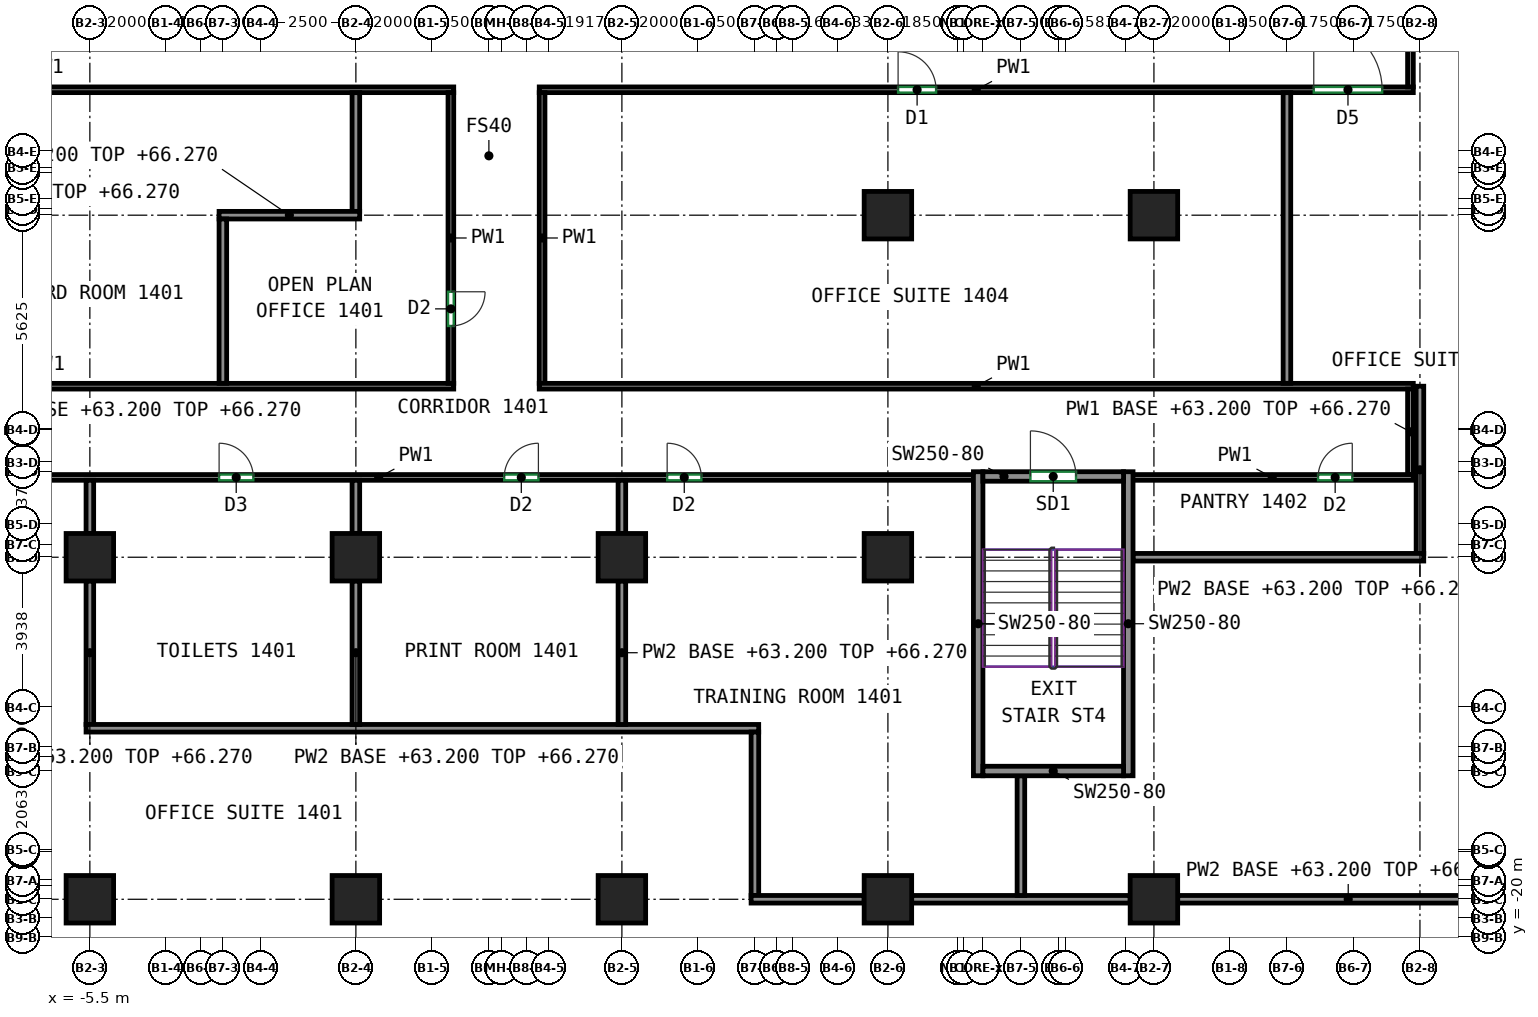
"""IFC4 building model, lengths in metres.
Left out: names, types, materials, properties, quantities, classifications, styles, units other than length and angle.
Written with IfcOpenShell. Run it as: python <this file> out.ifc"""

import sys

from ifc_helpers import new_model, si_unit, direction, frame, frame_2d, origin, origin_2d, place, context, subcontext, project, spatial, rectangle, extrude, source, transform, mapped, element, fill, save


model = new_model("IFC4")
c1 = context("Model", 3, precision=1e-05, world=origin(), true_north=direction((0.0, 1.0)))
c2 = subcontext(c1, "Body", "Model", "MODEL_VIEW")
j1 = project(units=[si_unit("LENGTHUNIT", "METRE"), si_unit("PLANEANGLEUNIT", "RADIAN")], contexts=[c1])
p1 = place(None, origin())
s1 = spatial("IfcSite", under=j1, at=p1, CompositionType="ELEMENT")
p2 = place(p1, origin())
s2 = spatial("IfcBuilding", under=s1, at=p2, CompositionType="ELEMENT")
p3 = place(p2, frame((0.0, 0.0, 63.2)))
s3 = spatial("IfcBuildingStorey", under=s2, at=p3, CompositionType="ELEMENT", Elevation=63.2)
m1 = source(origin(), c2, "Body", "SweptSolid", [
    extrude(rectangle(XDim=1.25, YDim=1.25, at=origin_2d()), origin(), (0.0, 0.0, 1.0), 3.72),
])
for number, where, z_axis, x_axis in (
    (1, (-5.5, -19.0, 0.0), (0.0, 0.0, 1.0), (1.0, 0.0, 0.0)),
    (2, (-5.5, -10.0, 0.0), (0.0, 0.0, 1.0), (1.0, 0.0, 0.0)),
    (3, (1.5, -19.0, 0.0), (0.0, 0.0, 1.0), (1.0, 0.0, 0.0)),
    (4, (1.5, -10.0, 0.0), (0.0, 0.0, 1.0), (1.0, 0.0, 0.0)),
    (5, (8.5, -19.0, 0.0), (0.0, 0.0, 1.0), (1.0, 0.0, 0.0)),
    (6, (8.5, -10.0, 0.0), (0.0, 0.0, 1.0), (1.0, 0.0, 0.0)),
    (7, (15.5, -19.0, 0.0), (0.0, 0.0, 1.0), (1.0, 0.0, 0.0)),
    (8, (15.5, -10.0, 0.0), (0.0, 0.0, 1.0), (1.0, 0.0, 0.0)),
    (9, (15.5, -1.0, 0.0), (0.0, 0.0, 1.0), (1.0, 0.0, 0.0)),
    (10, (22.5, -19.0, 0.0), (0.0, 0.0, 1.0), (1.0, 0.0, 0.0)),
    (11, (22.5, -1.0, 0.0), (0.0, 0.0, 1.0), (1.0, 0.0, 0.0)),
):
    element("IfcColumn", number, at=place(p3, frame(where, z_axis=z_axis, x_axis=x_axis)), inside=s3, PredefinedType="COLUMN", context=c2, shape_type="MappedRepresentation", body=[
        mapped(m1, transform((0.0, 0.0, 0.0))),
    ])
m2 = source(origin(), c2, "Body", "SweptSolid", [
    extrude(rectangle(XDim=8.0, YDim=0.25, at=frame_2d((4.0, 0.0))), origin(), (0.0, 0.0, 1.0), 3.72),
])
for number, where, z_axis, x_axis in (
    (12, (17.875, -15.75, 0.0), (0.0, 0.0, 1.0), (0.0, 1.0, 0.0)),
    (13, (21.825, -15.75, 0.0), (0.0, 0.0, 1.0), (0.0, 1.0, 0.0)),
):
    element("IfcWall", number, at=place(p3, frame(where, z_axis=z_axis, x_axis=x_axis)), inside=s3, PredefinedType="SHEAR", context=c2, shape_type="MappedRepresentation", body=[
        mapped(m2, transform((0.0, 0.0, 0.0))),
    ])
m3 = source(origin(), c2, "Body", "SweptSolid", [
    extrude(rectangle(XDim=3.7, YDim=0.25, at=frame_2d((1.85, 0.0))), origin(), (0.0, 0.0, 1.0), 3.72),
])
p4 = place(p3, frame((18.0, -15.625, 0.0), z_axis=(0.0, 0.0, 1.0), x_axis=(1.0, 0.0, 0.0)))
e14 = element("IfcWall", 14, at=p4, inside=s3, PredefinedType="SHEAR", context=c2, shape_type="MappedRepresentation", body=[
    mapped(m3, transform((0.0, 0.0, 0.0))),
])
p5 = place(p3, frame((18.0, -7.875, 0.0), z_axis=(0.0, 0.0, 1.0), x_axis=(1.0, 0.0, 0.0)))
e15 = element("IfcWall", 15, at=p5, inside=s3, PredefinedType="SHEAR", context=c2, shape_type="MappedRepresentation", body=[
    mapped(m3, transform((0.0, 0.0, 0.0))),
])
p6 = place(p5, frame((1.25, 0.0, 0.0)))
e16 = element("IfcOpeningElement", 16, at=p6, cuts=e15, PredefinedType="OPENING", context=c2, shape_type="SweptSolid", body=[
    extrude(rectangle(XDim=1.2, YDim=2.1, at=frame_2d((0.6, 1.05))), frame((0.0, 0.135, 0.0), z_axis=(0.0, -1.0, 0.0), x_axis=(1.0, 0.0, 0.0)), (0.0, 0.0, 1.0), 0.27),
])
p7 = place(p3, frame((-13.6, -7.9, 0.0), z_axis=(0.0, 0.0, 1.0), x_axis=(1.0, 0.0, 0.0)))
e17 = element("IfcWall", 17, at=p7, inside=s3, PredefinedType="PARTITIONING", context=c2, shape_type="SweptSolid", body=[
    extrude(rectangle(XDim=31.4, YDim=0.15, at=frame_2d((15.7, 0.0))), origin(), (0.0, 0.0, 1.0), 3.72),
])
p8 = place(p7, frame((11.501, 0.0, 0.0)))
e18 = element("IfcOpeningElement", 18, at=p8, cuts=e17, PredefinedType="OPENING", context=c2, shape_type="SweptSolid", body=[
    extrude(rectangle(XDim=0.9, YDim=2.1, at=frame_2d((0.45, 1.05))), frame((0.0, 0.085, 0.0), z_axis=(0.0, -1.0, 0.0), x_axis=(1.0, 0.0, 0.0)), (0.0, 0.0, 1.0), 0.17),
])
p9 = place(p7, frame((19.003, 0.0, 0.0)))
e19 = element("IfcOpeningElement", 19, at=p9, cuts=e17, PredefinedType="OPENING", context=c2, shape_type="SweptSolid", body=[
    extrude(rectangle(XDim=0.9, YDim=2.1, at=frame_2d((0.45, 1.05))), frame((0.0, 0.085, 0.0), z_axis=(0.0, -1.0, 0.0), x_axis=(1.0, 0.0, 0.0)), (0.0, 0.0, 1.0), 0.17),
])
p10 = place(p7, frame((23.291, 0.0, 0.0)))
e20 = element("IfcOpeningElement", 20, at=p10, cuts=e17, PredefinedType="OPENING", context=c2, shape_type="SweptSolid", body=[
    extrude(rectangle(XDim=0.9, YDim=2.1, at=frame_2d((0.45, 1.05))), frame((0.0, 0.085, 0.0), z_axis=(0.0, -1.0, 0.0), x_axis=(1.0, 0.0, 0.0)), (0.0, 0.0, 1.0), 0.17),
])
p11 = place(p3, frame((-19.25, -5.5, 0.0), z_axis=(0.0, 0.0, 1.0), x_axis=(1.0, 0.0, 0.0)))
e21 = element("IfcWall", 21, at=p11, inside=s3, PredefinedType="PARTITIONING", context=c2, shape_type="SweptSolid", body=[
    extrude(rectangle(XDim=23.325, YDim=0.15, at=frame_2d((11.663, 0.0))), origin(), (0.0, 0.0, 1.0), 3.72),
])
p12 = place(p11, frame((9.06, 0.0, 0.0)))
e22 = element("IfcOpeningElement", 22, at=p12, cuts=e21, PredefinedType="OPENING", context=c2, shape_type="SweptSolid", body=[
    extrude(rectangle(XDim=0.9, YDim=2.1, at=frame_2d((0.45, 1.05))), frame((0.0, 0.085, 0.0), z_axis=(0.0, -1.0, 0.0), x_axis=(1.0, 0.0, 0.0)), (0.0, 0.0, 1.0), 0.17),
])
p13 = place(p3, frame((-19.325, 2.3, 0.0), z_axis=(0.0, 0.0, 1.0), x_axis=(1.0, 0.0, 0.0)))
e23 = element("IfcWall", 23, at=p13, inside=s3, PredefinedType="PARTITIONING", context=c2, shape_type="SweptSolid", body=[
    extrude(rectangle(XDim=23.4, YDim=0.15, at=frame_2d((11.7, 0.0))), origin(), (0.0, 0.0, 1.0), 3.72),
])
p14 = place(p13, frame((2.414, 0.0, 0.0)))
e24 = element("IfcOpeningElement", 24, at=p14, cuts=e23, PredefinedType="OPENING", context=c2, shape_type="SweptSolid", body=[
    extrude(rectangle(XDim=0.9, YDim=2.1, at=frame_2d((0.45, 1.05))), frame((0.0, 0.085, 0.0), z_axis=(0.0, -1.0, 0.0), x_axis=(1.0, 0.0, 0.0)), (0.0, 0.0, 1.0), 0.17),
])
p15 = place(p13, frame((7.115, 0.0, 0.0)))
e25 = element("IfcOpeningElement", 25, at=p15, cuts=e23, PredefinedType="OPENING", context=c2, shape_type="SweptSolid", body=[
    extrude(rectangle(XDim=0.9, YDim=2.1, at=frame_2d((0.45, 1.05))), frame((0.0, 0.085, 0.0), z_axis=(0.0, -1.0, 0.0), x_axis=(1.0, 0.0, 0.0)), (0.0, 0.0, 1.0), 0.17),
])
p16 = place(p3, frame((4.0, 2.225, 0.0), z_axis=(0.0, 0.0, 1.0), x_axis=(0.0, -1.0, 0.0)))
e26 = element("IfcWall", 26, at=p16, inside=s3, PredefinedType="PARTITIONING", context=c2, shape_type="SweptSolid", body=[
    extrude(rectangle(XDim=7.65, YDim=0.15, at=frame_2d((3.825, 0.0))), origin(), (0.0, 0.0, 1.0), 3.72),
])
p17 = place(p16, frame((5.24, 0.0, 0.0)))
e27 = element("IfcOpeningElement", 27, at=p17, cuts=e26, PredefinedType="OPENING", context=c2, shape_type="SweptSolid", body=[
    extrude(rectangle(XDim=0.9, YDim=2.1, at=frame_2d((0.45, 1.05))), frame((0.0, 0.085, 0.0), z_axis=(0.0, -1.0, 0.0), x_axis=(1.0, 0.0, 0.0)), (0.0, 0.0, 1.0), 0.17),
])
p18 = place(p3, frame((6.325, 2.3, 0.0), z_axis=(0.0, 0.0, 1.0), x_axis=(1.0, 0.0, 0.0)))
e28 = element("IfcWall", 28, at=p18, inside=s3, PredefinedType="PARTITIONING", context=c2, shape_type="SweptSolid", body=[
    extrude(rectangle(XDim=23.0, YDim=0.15, at=frame_2d((11.5, 0.0))), origin(), (0.0, 0.0, 1.0), 3.72),
])
p19 = place(p18, frame((9.443, 0.0, 0.0)))
e29 = element("IfcOpeningElement", 29, at=p19, cuts=e28, PredefinedType="OPENING", context=c2, shape_type="SweptSolid", body=[
    extrude(rectangle(XDim=1.0, YDim=2.1, at=frame_2d((0.5, 1.05))), frame((0.0, 0.085, 0.0), z_axis=(0.0, -1.0, 0.0), x_axis=(1.0, 0.0, 0.0)), (0.0, 0.0, 1.0), 0.17),
])
p20 = place(p18, frame((20.381, 0.0, 0.0)))
e30 = element("IfcOpeningElement", 30, at=p20, cuts=e28, PredefinedType="OPENING", context=c2, shape_type="SweptSolid", body=[
    extrude(rectangle(XDim=1.8, YDim=2.1, at=frame_2d((0.9, 1.05))), frame((0.0, 0.085, 0.0), z_axis=(0.0, -1.0, 0.0), x_axis=(1.0, 0.0, 0.0)), (0.0, 0.0, 1.0), 0.17),
])
p21 = place(p3, frame((6.4, -5.425, 0.0), z_axis=(0.0, 0.0, 1.0), x_axis=(0.0, 1.0, 0.0)))
e31 = element("IfcWall", 31, at=p21, inside=s3, PredefinedType="PARTITIONING", context=c2, shape_type="SweptSolid", body=[
    extrude(rectangle(XDim=7.65, YDim=0.15, at=frame_2d((3.825, 0.0))), origin(), (0.0, 0.0, 1.0), 3.72),
])
p22 = place(p3, frame((6.325, -5.5, 0.0), z_axis=(0.0, 0.0, 1.0), x_axis=(1.0, 0.0, 0.0)))
e32 = element("IfcWall", 32, at=p22, inside=s3, PredefinedType="PARTITIONING", context=c2, shape_type="SweptSolid", body=[
    extrude(rectangle(XDim=23.0, YDim=0.15, at=frame_2d((11.5, 0.0))), origin(), (0.0, 0.0, 1.0), 3.72),
])
p23 = place(p3, frame((29.25, -7.825, 0.0), z_axis=(0.0, 0.0, 1.0), x_axis=(0.0, 1.0, 0.0)))
e33 = element("IfcWall", 33, at=p23, inside=s3, PredefinedType="PARTITIONING", context=c2, shape_type="SweptSolid", body=[
    extrude(rectangle(XDim=2.25, YDim=0.15, at=frame_2d((1.125, 0.0))), origin(), (0.0, 0.0, 1.0), 3.07),
])
p24 = place(p3, frame((21.9, -7.9, 0.0), z_axis=(0.0, 0.0, 1.0), x_axis=(1.0, 0.0, 0.0)))
e34 = element("IfcWall", 34, at=p24, inside=s3, PredefinedType="PARTITIONING", context=c2, shape_type="SweptSolid", body=[
    extrude(rectangle(XDim=7.425, YDim=0.15, at=frame_2d((3.712, 0.0))), origin(), (0.0, 0.0, 1.0), 3.72),
])
p25 = place(p24, frame((4.919, 0.0, 0.0)))
e35 = element("IfcOpeningElement", 35, at=p25, cuts=e34, PredefinedType="OPENING", context=c2, shape_type="SweptSolid", body=[
    extrude(rectangle(XDim=0.9, YDim=2.1, at=frame_2d((0.45, 1.05))), frame((0.0, 0.085, 0.0), z_axis=(0.0, -1.0, 0.0), x_axis=(1.0, 0.0, 0.0)), (0.0, 0.0, 1.0), 0.17),
])
p26 = place(p3, frame((29.25, 2.375, 0.0), z_axis=(0.0, 0.0, 1.0), x_axis=(0.0, 1.0, 0.0)))
e36 = element("IfcWall", 36, at=p26, inside=s3, PredefinedType="PARTITIONING", context=c2, shape_type="SweptSolid", body=[
    extrude(rectangle(XDim=2.25, YDim=0.15, at=frame_2d((1.125, 0.0))), origin(), (0.0, 0.0, 1.0), 3.07),
])
p27 = place(p3, frame((-5.5, -9.375, 0.0), z_axis=(0.0, 0.0, 1.0), x_axis=(0.0, 1.0, 0.0)))
e37 = element("IfcWall", 37, at=p27, inside=s3, PredefinedType="PARTITIONING", context=c2, shape_type="SweptSolid", body=[
    extrude(rectangle(XDim=1.399, YDim=0.2, at=frame_2d((0.699, 0.0))), origin(), (0.0, 0.0, 1.0), 3.72),
])
p28 = place(p3, frame((-5.5, -14.4, 0.0), z_axis=(0.0, 0.0, 1.0), x_axis=(0.0, 1.0, 0.0)))
e38 = element("IfcWall", 38, at=p28, inside=s3, PredefinedType="PARTITIONING", context=c2, shape_type="SweptSolid", body=[
    extrude(rectangle(XDim=3.775, YDim=0.2, at=frame_2d((1.887, 0.0))), origin(), (0.0, 0.0, 1.0), 3.07),
])
p29 = place(p3, frame((-5.6, -14.5, 0.0), z_axis=(0.0, 0.0, 1.0), x_axis=(1.0, 0.0, 0.0)))
e39 = element("IfcWall", 39, at=p29, inside=s3, PredefinedType="PARTITIONING", context=c2, shape_type="SweptSolid", body=[
    extrude(rectangle(XDim=17.7, YDim=0.2, at=frame_2d((8.85, 0.0))), origin(), (0.0, 0.0, 1.0), 3.72),
])
p30 = place(p3, frame((12.0, -18.9, 0.0), z_axis=(0.0, 0.0, 1.0), x_axis=(0.0, 1.0, 0.0)))
e40 = element("IfcWall", 40, at=p30, inside=s3, PredefinedType="PARTITIONING", context=c2, shape_type="SweptSolid", body=[
    extrude(rectangle(XDim=4.3, YDim=0.2, at=frame_2d((2.15, 0.0))), origin(), (0.0, 0.0, 1.0), 3.72),
])
p31 = place(p3, frame((11.9, -19.0, 0.0), z_axis=(0.0, 0.0, 1.0), x_axis=(1.0, 0.0, 0.0)))
e41 = element("IfcWall", 41, at=p31, inside=s3, PredefinedType="PARTITIONING", context=c2, shape_type="SweptSolid", body=[
    extrude(rectangle(XDim=2.975, YDim=0.2, at=frame_2d((1.488, 0.0))), origin(), (0.0, 0.0, 1.0), 3.72),
])
p32 = place(p3, frame((16.125, -19.0, 0.0), z_axis=(0.0, 0.0, 1.0), x_axis=(1.0, 0.0, 0.0)))
e42 = element("IfcWall", 42, at=p32, inside=s3, PredefinedType="PARTITIONING", context=c2, shape_type="SweptSolid", body=[
    extrude(rectangle(XDim=5.75, YDim=0.2, at=frame_2d((2.875, 0.0))), origin(), (0.0, 0.0, 1.0), 3.72),
])
p33 = place(p3, frame((23.125, -19.0, 0.0), z_axis=(0.0, 0.0, 1.0), x_axis=(1.0, 0.0, 0.0)))
e43 = element("IfcWall", 43, at=p33, inside=s3, PredefinedType="PARTITIONING", context=c2, shape_type="SweptSolid", body=[
    extrude(rectangle(XDim=8.975, YDim=0.2, at=frame_2d((4.488, 0.0))), origin(), (0.0, 0.0, 1.0), 3.07),
])
p34 = place(p3, frame((1.5, -0.9, 0.0), z_axis=(0.0, 0.0, 1.0), x_axis=(0.0, 1.0, 0.0)))
e44 = element("IfcWall", 44, at=p34, inside=s3, PredefinedType="PARTITIONING", context=c2, shape_type="SweptSolid", body=[
    extrude(rectangle(XDim=3.124, YDim=0.2, at=frame_2d((1.562, 0.0))), origin(), (0.0, 0.0, 1.0), 3.72),
])
p35 = place(p3, frame((-2.1, -1.0, 0.0), z_axis=(0.0, 0.0, 1.0), x_axis=(1.0, 0.0, 0.0)))
e45 = element("IfcWall", 45, at=p35, inside=s3, PredefinedType="PARTITIONING", context=c2, shape_type="SweptSolid", body=[
    extrude(rectangle(XDim=3.7, YDim=0.2, at=frame_2d((1.85, 0.0))), origin(), (0.0, 0.0, 1.0), 3.07),
])
p36 = place(p3, frame((-2.0, -5.424, 0.0), z_axis=(0.0, 0.0, 1.0), x_axis=(0.0, 1.0, 0.0)))
e46 = element("IfcWall", 46, at=p36, inside=s3, PredefinedType="PARTITIONING", context=c2, shape_type="SweptSolid", body=[
    extrude(rectangle(XDim=4.324, YDim=0.2, at=frame_2d((2.162, 0.0))), origin(), (0.0, 0.0, 1.0), 3.72),
])
p37 = place(p3, frame((1.5, -9.375, 0.0), z_axis=(0.0, 0.0, 1.0), x_axis=(0.0, 1.0, 0.0)))
e47 = element("IfcWall", 47, at=p37, inside=s3, PredefinedType="PARTITIONING", context=c2, shape_type="SweptSolid", body=[
    extrude(rectangle(XDim=1.399, YDim=0.2, at=frame_2d((0.699, 0.0))), origin(), (0.0, 0.0, 1.0), 3.72),
])
p38 = place(p3, frame((1.5, -14.4, 0.0), z_axis=(0.0, 0.0, 1.0), x_axis=(0.0, 1.0, 0.0)))
e48 = element("IfcWall", 48, at=p38, inside=s3, PredefinedType="PARTITIONING", context=c2, shape_type="SweptSolid", body=[
    extrude(rectangle(XDim=3.775, YDim=0.2, at=frame_2d((1.887, 0.0))), origin(), (0.0, 0.0, 1.0), 3.07),
])
p39 = place(p3, frame((8.5, -9.375, 0.0), z_axis=(0.0, 0.0, 1.0), x_axis=(0.0, 1.0, 0.0)))
e49 = element("IfcWall", 49, at=p39, inside=s3, PredefinedType="PARTITIONING", context=c2, shape_type="SweptSolid", body=[
    extrude(rectangle(XDim=1.399, YDim=0.2, at=frame_2d((0.699, 0.0))), origin(), (0.0, 0.0, 1.0), 3.72),
])
p40 = place(p3, frame((8.5, -14.4, 0.0), z_axis=(0.0, 0.0, 1.0), x_axis=(0.0, 1.0, 0.0)))
e50 = element("IfcWall", 50, at=p40, inside=s3, PredefinedType="PARTITIONING", context=c2, shape_type="SweptSolid", body=[
    extrude(rectangle(XDim=3.775, YDim=0.2, at=frame_2d((1.887, 0.0))), origin(), (0.0, 0.0, 1.0), 3.07),
])
p41 = place(p3, frame((26.0, -5.424, 0.0), z_axis=(0.0, 0.0, 1.0), x_axis=(0.0, 1.0, 0.0)))
e51 = element("IfcWall", 51, at=p41, inside=s3, PredefinedType="PARTITIONING", context=c2, shape_type="SweptSolid", body=[
    extrude(rectangle(XDim=7.648, YDim=0.2, at=frame_2d((3.824, 0.0))), origin(), (0.0, 0.0, 1.0), 3.72),
])
p42 = place(p3, frame((19.0, -18.9, 0.0), z_axis=(0.0, 0.0, 1.0), x_axis=(0.0, 1.0, 0.0)))
e52 = element("IfcWall", 52, at=p42, inside=s3, PredefinedType="PARTITIONING", context=c2, shape_type="SweptSolid", body=[
    extrude(rectangle(XDim=3.15, YDim=0.2, at=frame_2d((1.575, 0.0))), origin(), (0.0, 0.0, 1.0), 3.72),
])
p43 = place(p3, frame((29.5, -9.9, 0.0), z_axis=(0.0, 0.0, 1.0), x_axis=(0.0, 1.0, 0.0)))
e53 = element("IfcWall", 53, at=p43, inside=s3, PredefinedType="PARTITIONING", context=c2, shape_type="SweptSolid", body=[
    extrude(rectangle(XDim=4.4, YDim=0.2, at=frame_2d((2.2, 0.0))), origin(), (0.0, 0.0, 1.0), 3.07),
])
p44 = place(p3, frame((21.95, -10.0, 0.0), z_axis=(0.0, 0.0, 1.0), x_axis=(1.0, 0.0, 0.0)))
e54 = element("IfcWall", 54, at=p44, inside=s3, PredefinedType="PARTITIONING", context=c2, shape_type="SweptSolid", body=[
    extrude(rectangle(XDim=7.65, YDim=0.2, at=frame_2d((3.825, 0.0))), origin(), (0.0, 0.0, 1.0), 3.72),
])
p45 = place(p6, origin())
e55 = element("IfcDoor", 55, at=p45, inside=s3, OperationType="DOUBLE_DOOR_SINGLE_SWING", PredefinedType="DOOR", context=c2, shape_type="SweptSolid", body=[
    extrude(rectangle(XDim=1.2, YDim=2.1, at=frame_2d((0.6, 1.05))), frame((0.0, 0.025, 0.0), z_axis=(0.0, -1.0, 0.0), x_axis=(1.0, 0.0, 0.0)), (0.0, 0.0, 1.0), 0.05),
])
fill(e16, e55)
p46 = place(p8, origin())
e56 = element("IfcDoor", 56, at=p46, inside=s3, OperationType="SINGLE_SWING_LEFT", PredefinedType="DOOR", context=c2, shape_type="SweptSolid", body=[
    extrude(rectangle(XDim=0.9, YDim=2.1, at=frame_2d((0.45, 1.05))), frame((0.0, 0.025, 0.0), z_axis=(0.0, -1.0, 0.0), x_axis=(1.0, 0.0, 0.0)), (0.0, 0.0, 1.0), 0.05),
])
fill(e18, e56)
p47 = place(p9, origin())
e57 = element("IfcDoor", 57, at=p47, inside=s3, OperationType="SINGLE_SWING_RIGHT", PredefinedType="DOOR", context=c2, shape_type="SweptSolid", body=[
    extrude(rectangle(XDim=0.9, YDim=2.1, at=frame_2d((0.45, 1.05))), frame((0.0, 0.025, 0.0), z_axis=(0.0, -1.0, 0.0), x_axis=(1.0, 0.0, 0.0)), (0.0, 0.0, 1.0), 0.05),
])
fill(e19, e57)
p48 = place(p10, origin())
e58 = element("IfcDoor", 58, at=p48, inside=s3, OperationType="SINGLE_SWING_LEFT", PredefinedType="DOOR", context=c2, shape_type="SweptSolid", body=[
    extrude(rectangle(XDim=0.9, YDim=2.1, at=frame_2d((0.45, 1.05))), frame((0.0, 0.025, 0.0), z_axis=(0.0, -1.0, 0.0), x_axis=(1.0, 0.0, 0.0)), (0.0, 0.0, 1.0), 0.05),
])
fill(e20, e58)
p49 = place(p25, origin())
e59 = element("IfcDoor", 59, at=p49, inside=s3, OperationType="SINGLE_SWING_RIGHT", PredefinedType="DOOR", context=c2, shape_type="SweptSolid", body=[
    extrude(rectangle(XDim=0.9, YDim=2.1, at=frame_2d((0.45, 1.05))), frame((0.0, 0.025, 0.0), z_axis=(0.0, -1.0, 0.0), x_axis=(1.0, 0.0, 0.0)), (0.0, 0.0, 1.0), 0.05),
])
fill(e35, e59)
p50 = place(p17, origin())
e60 = element("IfcDoor", 60, at=p50, inside=s3, OperationType="SINGLE_SWING_LEFT", PredefinedType="DOOR", context=c2, shape_type="SweptSolid", body=[
    extrude(rectangle(XDim=0.9, YDim=2.1, at=frame_2d((0.45, 1.05))), frame((0.0, 0.025, 0.0), z_axis=(0.0, -1.0, 0.0), x_axis=(1.0, 0.0, 0.0)), (0.0, 0.0, 1.0), 0.05),
])
fill(e27, e60)
p51 = place(p19, origin())
e61 = element("IfcDoor", 61, at=p51, inside=s3, OperationType="SINGLE_SWING_LEFT", PredefinedType="DOOR", context=c2, shape_type="SweptSolid", body=[
    extrude(rectangle(XDim=1.0, YDim=2.1, at=frame_2d((0.5, 1.05))), frame((0.0, 0.025, 0.0), z_axis=(0.0, -1.0, 0.0), x_axis=(1.0, 0.0, 0.0)), (0.0, 0.0, 1.0), 0.05),
])
fill(e29, e61)
p52 = place(p20, origin())
e62 = element("IfcDoor", 62, at=p52, inside=s3, OperationType="DOUBLE_DOOR_SINGLE_SWING", PredefinedType="DOOR", context=c2, shape_type="SweptSolid", body=[
    extrude(rectangle(XDim=1.8, YDim=2.1, at=frame_2d((0.9, 1.05))), frame((0.0, 0.025, 0.0), z_axis=(0.0, -1.0, 0.0), x_axis=(1.0, 0.0, 0.0)), (0.0, 0.0, 1.0), 0.05),
])
fill(e30, e62)
save(model, sys.argv[1])
